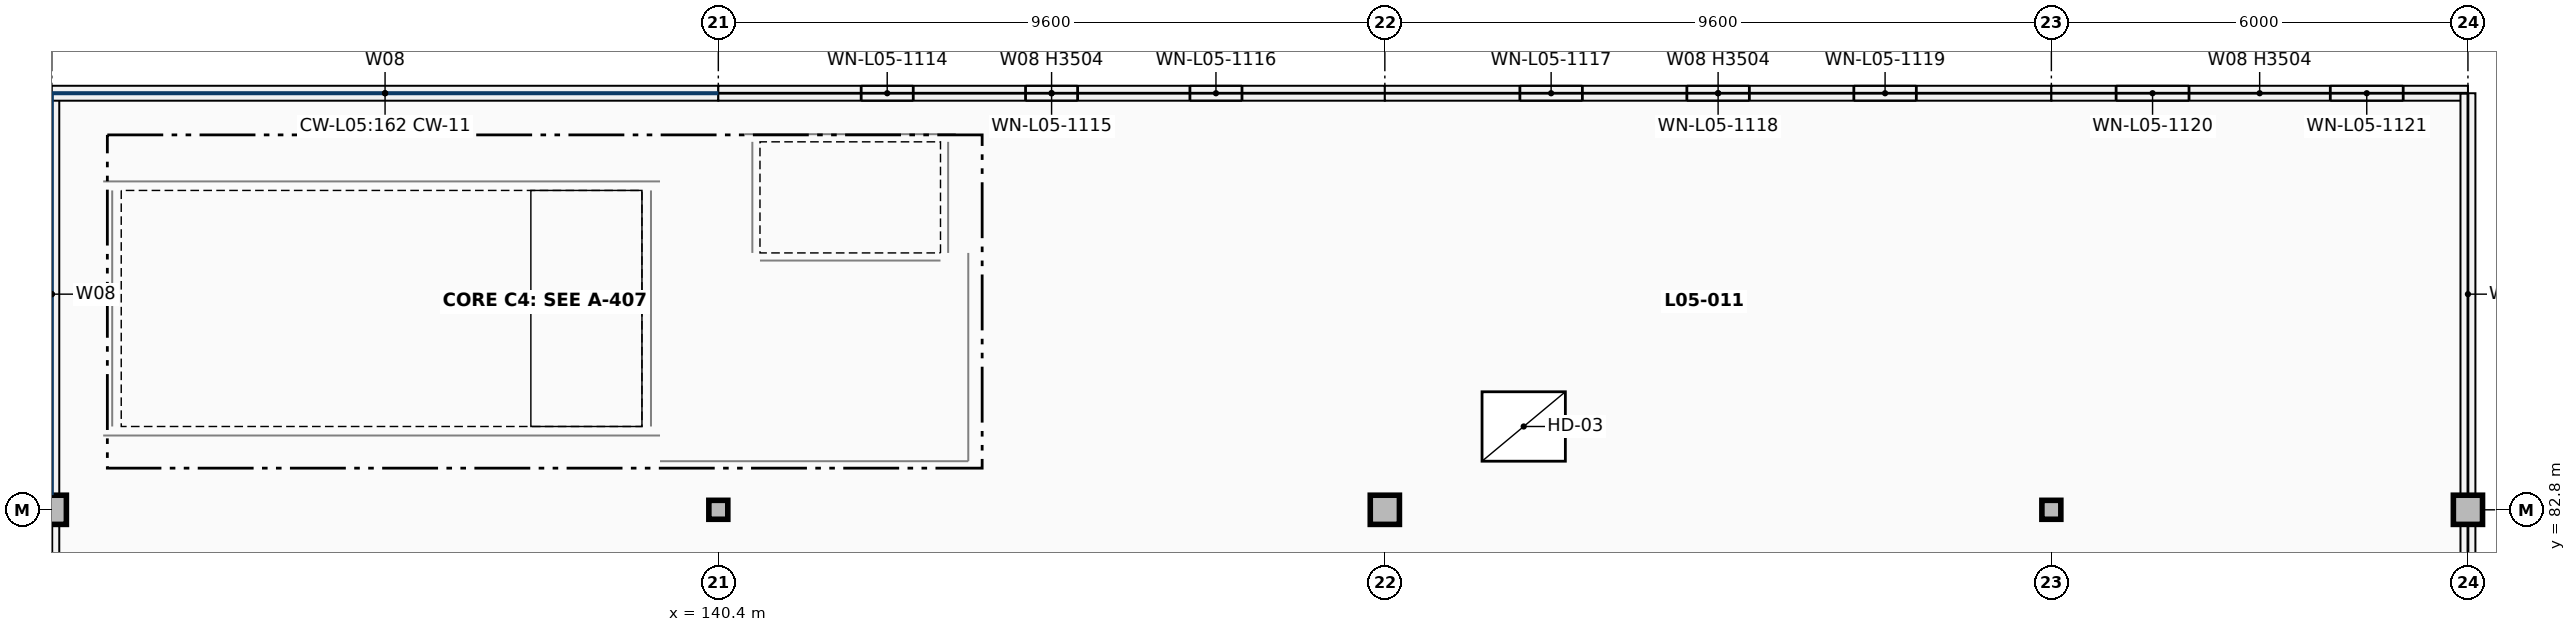
"""IFC4 building model, lengths in metres.
Left out: names, types, materials, properties, quantities, classifications, styles, units other than length and angle.
Written with IfcOpenShell. Run it as: python <this file> out.ifc"""

import sys

from ifc_helpers import new_model, si_unit, direction, frame, frame_2d, origin, origin_2d, place, context, subcontext, project, spatial, rectangle, hollow_circle, extrude, element, fill, save


model = new_model("IFC4")
c1 = context("Model", 3, precision=1e-05, world=origin(), true_north=direction((0.0, 1.0)))
c2 = subcontext(c1, "Body", "Model", "MODEL_VIEW")
j1 = project(units=[si_unit("LENGTHUNIT", "METRE"), si_unit("PLANEANGLEUNIT", "RADIAN")], contexts=[c1])
p1 = place(None, origin())
s1 = spatial("IfcSite", under=j1, at=p1, CompositionType="ELEMENT")
p2 = place(p1, origin())
s2 = spatial("IfcBuilding", under=s1, at=p2, CompositionType="ELEMENT")
p3 = place(p2, frame((0.0, 0.0, 21.08)))
s3 = spatial("IfcBuildingStorey", under=s2, at=p3, CompositionType="ELEMENT", Elevation=21.08)
p4 = place(p3, frame((130.8, 82.8, 0.0), z_axis=(0.0, 0.0, 1.0), x_axis=(1.0, 0.0, 0.0)))
e1 = element("IfcColumn", 1, at=p4, inside=s3, PredefinedType="COLUMN", context=c2, shape_type="SweptSolid", body=[
    extrude(rectangle(XDim=0.42, YDim=0.42, at=origin_2d()), origin(), (0.0, 0.0, 1.0), 3.74),
])
p5 = place(p3, frame((140.4, 82.8, 0.0), z_axis=(0.0, 0.0, 1.0), x_axis=(1.0, 0.0, 0.0)))
e2 = element("IfcColumn", 2, at=p5, inside=s3, PredefinedType="COLUMN", context=c2, shape_type="SweptSolid", body=[
    extrude(hollow_circle(Radius=0.136, WallThickness=0.012, at=origin_2d()), origin(), (0.0, 0.0, 1.0), 3.7),
])
p6 = place(p3, frame((150.0, 82.8, 0.0), z_axis=(0.0, 0.0, 1.0), x_axis=(1.0, 0.0, 0.0)))
e3 = element("IfcColumn", 3, at=p6, inside=s3, PredefinedType="COLUMN", context=c2, shape_type="SweptSolid", body=[
    extrude(rectangle(XDim=0.42, YDim=0.42, at=origin_2d()), origin(), (0.0, 0.0, 1.0), 3.74),
])
p7 = place(p3, frame((159.6, 82.8, 0.0), z_axis=(0.0, 0.0, 1.0), x_axis=(1.0, 0.0, 0.0)))
e4 = element("IfcColumn", 4, at=p7, inside=s3, PredefinedType="COLUMN", context=c2, shape_type="SweptSolid", body=[
    extrude(hollow_circle(Radius=0.136, WallThickness=0.012, at=origin_2d()), origin(), (0.0, 0.0, 1.0), 3.7),
])
p8 = place(p3, frame((165.6, 82.8, 0.0), z_axis=(0.0, 0.0, 1.0), x_axis=(1.0, 0.0, 0.0)))
e5 = element("IfcColumn", 5, at=p8, inside=s3, PredefinedType="COLUMN", context=c2, shape_type="SweptSolid", body=[
    extrude(rectangle(XDim=0.42, YDim=0.42, at=origin_2d()), origin(), (0.0, 0.0, 1.0), 3.74),
])
p9 = place(p3, frame((130.8, 79.412, 0.0), z_axis=(0.0, 0.0, 1.0), x_axis=(0.0, 1.0, 0.0)))
e6 = element("IfcWall", 6, at=p9, inside=s3, PredefinedType="SOLIDWALL", context=c2, shape_type="SweptSolid", body=[
    extrude(rectangle(XDim=3.176, YDim=0.215, at=frame_2d((1.588, 0.0))), origin(), (0.0, 0.0, 1.0), 2.884),
])
p10 = place(p3, frame((130.8, 83.012, 0.0), z_axis=(0.0, 0.0, 1.0), x_axis=(0.0, 1.0, 0.0)))
e7 = element("IfcWall", 7, at=p10, inside=s3, PredefinedType="SOLIDWALL", context=c2, shape_type="SweptSolid", body=[
    extrude(rectangle(XDim=5.788, YDim=0.215, at=frame_2d((2.894, 0.0))), origin(), (0.0, 0.0, 1.0), 0.85),
])
p11 = place(p3, frame((130.8, 88.8, 0.0), z_axis=(0.0, 0.0, 1.0), x_axis=(1.0, 0.0, 0.0)))
e8 = element("IfcWall", 8, at=p11, inside=s3, PredefinedType="SOLIDWALL", context=c2, shape_type="SweptSolid", body=[
    extrude(rectangle(XDim=9.6, YDim=0.215, at=frame_2d((4.8, 0.0))), origin(), (0.0, 0.0, 1.0), 0.85),
])
p12 = place(p3, frame((140.4, 88.8, 0.0), z_axis=(0.0, 0.0, 1.0), x_axis=(1.0, 0.0, 0.0)))
e9 = element("IfcWall", 9, at=p12, inside=s3, PredefinedType="SOLIDWALL", context=c2, shape_type="SweptSolid", body=[
    extrude(rectangle(XDim=9.6, YDim=0.215, at=frame_2d((4.8, 0.0))), origin(), (0.0, 0.0, 1.0), 3.504),
])
p13 = place(p12, frame((2.058, 0.0, 0.75)))
e10 = element("IfcOpeningElement", 10, at=p13, cuts=e9, PredefinedType="OPENING", context=c2, shape_type="SweptSolid", body=[
    extrude(rectangle(XDim=0.75, YDim=1.5, at=frame_2d((0.375, 0.75))), frame((0.0, 0.118, 0.0), z_axis=(0.0, -1.0, 0.0), x_axis=(1.0, 0.0, 0.0)), (0.0, 0.0, 1.0), 0.235),
])
p14 = place(p12, frame((4.425, 0.0, 0.75)))
e11 = element("IfcOpeningElement", 11, at=p14, cuts=e9, PredefinedType="OPENING", context=c2, shape_type="SweptSolid", body=[
    extrude(rectangle(XDim=0.75, YDim=1.5, at=frame_2d((0.375, 0.75))), frame((0.0, 0.118, 0.0), z_axis=(0.0, -1.0, 0.0), x_axis=(1.0, 0.0, 0.0)), (0.0, 0.0, 1.0), 0.235),
])
p15 = place(p12, frame((6.792, 0.0, 0.75)))
e12 = element("IfcOpeningElement", 12, at=p15, cuts=e9, PredefinedType="OPENING", context=c2, shape_type="SweptSolid", body=[
    extrude(rectangle(XDim=0.75, YDim=1.5, at=frame_2d((0.375, 0.75))), frame((0.0, 0.118, 0.0), z_axis=(0.0, -1.0, 0.0), x_axis=(1.0, 0.0, 0.0)), (0.0, 0.0, 1.0), 0.235),
])
p16 = place(p3, frame((150.0, 88.8, 0.0), z_axis=(0.0, 0.0, 1.0), x_axis=(1.0, 0.0, 0.0)))
e13 = element("IfcWall", 13, at=p16, inside=s3, PredefinedType="SOLIDWALL", context=c2, shape_type="SweptSolid", body=[
    extrude(rectangle(XDim=9.6, YDim=0.215, at=frame_2d((4.8, 0.0))), origin(), (0.0, 0.0, 1.0), 3.504),
])
p17 = place(p16, frame((1.945, 0.0, 0.75)))
e14 = element("IfcOpeningElement", 14, at=p17, cuts=e13, PredefinedType="OPENING", context=c2, shape_type="SweptSolid", body=[
    extrude(rectangle(XDim=0.9, YDim=1.95, at=frame_2d((0.45, 0.975))), frame((0.0, 0.118, 0.0), z_axis=(0.0, -1.0, 0.0), x_axis=(1.0, 0.0, 0.0)), (0.0, 0.0, 1.0), 0.235),
])
p18 = place(p16, frame((4.35, 0.0, 0.75)))
e15 = element("IfcOpeningElement", 15, at=p18, cuts=e13, PredefinedType="OPENING", context=c2, shape_type="SweptSolid", body=[
    extrude(rectangle(XDim=0.9, YDim=1.95, at=frame_2d((0.45, 0.975))), frame((0.0, 0.118, 0.0), z_axis=(0.0, -1.0, 0.0), x_axis=(1.0, 0.0, 0.0)), (0.0, 0.0, 1.0), 0.235),
])
p19 = place(p16, frame((6.755, 0.0, 0.75)))
e16 = element("IfcOpeningElement", 16, at=p19, cuts=e13, PredefinedType="OPENING", context=c2, shape_type="SweptSolid", body=[
    extrude(rectangle(XDim=0.9, YDim=1.95, at=frame_2d((0.45, 0.975))), frame((0.0, 0.118, 0.0), z_axis=(0.0, -1.0, 0.0), x_axis=(1.0, 0.0, 0.0)), (0.0, 0.0, 1.0), 0.235),
])
p20 = place(p3, frame((159.6, 88.8, 0.0), z_axis=(0.0, 0.0, 1.0), x_axis=(1.0, 0.0, 0.0)))
e17 = element("IfcWall", 17, at=p20, inside=s3, PredefinedType="SOLIDWALL", context=c2, shape_type="SweptSolid", body=[
    extrude(rectangle(XDim=6.0, YDim=0.215, at=frame_2d((3.0, 0.0))), origin(), (0.0, 0.0, 1.0), 3.504),
])
p21 = place(p20, frame((0.933, 0.0, 0.75)))
e18 = element("IfcOpeningElement", 18, at=p21, cuts=e17, PredefinedType="OPENING", context=c2, shape_type="SweptSolid", body=[
    extrude(rectangle(XDim=1.05, YDim=2.3, at=frame_2d((0.525, 1.15))), frame((0.0, 0.118, 0.0), z_axis=(0.0, -1.0, 0.0), x_axis=(1.0, 0.0, 0.0)), (0.0, 0.0, 1.0), 0.235),
])
p22 = place(p20, frame((4.018, 0.0, 0.75)))
e19 = element("IfcOpeningElement", 19, at=p22, cuts=e17, PredefinedType="OPENING", context=c2, shape_type="SweptSolid", body=[
    extrude(rectangle(XDim=1.05, YDim=2.3, at=frame_2d((0.525, 1.15))), frame((0.0, 0.118, 0.0), z_axis=(0.0, -1.0, 0.0), x_axis=(1.0, 0.0, 0.0)), (0.0, 0.0, 1.0), 0.235),
])
p23 = place(p3, frame((165.6, 79.412, 0.0), z_axis=(0.0, 0.0, 1.0), x_axis=(0.0, 1.0, 0.0)))
e20 = element("IfcWall", 20, at=p23, inside=s3, PredefinedType="SOLIDWALL", context=c2, shape_type="SweptSolid", body=[
    extrude(rectangle(XDim=3.176, YDim=0.215, at=frame_2d((1.588, 0.0))), origin(), (0.0, 0.0, 1.0), 3.074),
])
p24 = place(p3, frame((165.6, 83.012, 0.0), z_axis=(0.0, 0.0, 1.0), x_axis=(0.0, 1.0, 0.0)))
e21 = element("IfcWall", 21, at=p24, inside=s3, PredefinedType="SOLIDWALL", context=c2, shape_type="SweptSolid", body=[
    extrude(rectangle(XDim=5.788, YDim=0.215, at=frame_2d((2.894, 0.0))), origin(), (0.0, 0.0, 1.0), 3.074),
])
p25 = place(p3, frame((131.67, 84.0, 0.0), z_axis=(0.0, 0.0, 1.0), x_axis=(0.0, 1.0, 0.0)))
e22 = element("IfcWall", 22, at=p25, inside=s3, PredefinedType="SHEAR", context=c2, shape_type="SweptSolid", body=[
    extrude(rectangle(XDim=3.4, YDim=0.26, at=frame_2d((1.7, 0.0))), origin(), (0.0, 0.0, 1.0), 3.74),
])
for number, where, z_axis, x_axis in (
    (23, (131.54, 83.87, 0.0), (0.0, 0.0, 1.0), (1.0, 0.0, 0.0)),
    (24, (131.54, 87.53, 0.0), (0.0, 0.0, 1.0), (1.0, 0.0, 0.0)),
):
    element("IfcWall", number, at=place(p3, frame(where, z_axis=z_axis, x_axis=x_axis)), inside=s3, PredefinedType="SHEAR", context=c2, shape_type="SweptSolid", body=[
        extrude(rectangle(XDim=8.02, YDim=0.26, at=frame_2d((4.01, 0.0))), origin(), (0.0, 0.0, 1.0), 3.74),
    ])
p26 = place(p3, frame((139.43, 84.0, 0.0), z_axis=(0.0, 0.0, 1.0), x_axis=(0.0, 1.0, 0.0)))
e25 = element("IfcWall", 25, at=p26, inside=s3, PredefinedType="SHEAR", context=c2, shape_type="SweptSolid", body=[
    extrude(rectangle(XDim=3.4, YDim=0.26, at=frame_2d((1.7, 0.0))), origin(), (0.0, 0.0, 1.0), 3.74),
])
p27 = place(p26, frame((0.65, 0.0, 0.0)))
e26 = element("IfcOpeningElement", 26, at=p27, cuts=e25, PredefinedType="OPENING", context=c2, shape_type="SweptSolid", body=[
    extrude(rectangle(XDim=1.2, YDim=2.2, at=frame_2d((0.6, 1.1))), frame((0.0, 0.14, 0.0), z_axis=(0.0, -1.0, 0.0), x_axis=(1.0, 0.0, 0.0)), (0.0, 0.0, 1.0), 0.28),
])
for number, where, z_axis, x_axis in (
    (27, (140.89, 86.5, 0.0), (0.0, 0.0, 1.0), (0.0, 1.0, 0.0)),
    (28, (143.71, 86.5, 0.0), (0.0, 0.0, 1.0), (0.0, 1.0, 0.0)),
):
    element("IfcWall", number, at=place(p3, frame(where, z_axis=z_axis, x_axis=x_axis)), inside=s3, PredefinedType="SHEAR", context=c2, shape_type="SweptSolid", body=[
        extrude(rectangle(XDim=1.6, YDim=0.22, at=frame_2d((0.8, 0.0))), origin(), (0.0, 0.0, 1.0), 3.74),
    ])
p28 = place(p3, frame((140.78, 88.21, 0.0), z_axis=(0.0, 0.0, 1.0), x_axis=(1.0, 0.0, 0.0)))
e29 = element("IfcWall", 29, at=p28, inside=s3, PredefinedType="SHEAR", context=c2, shape_type="SweptSolid", body=[
    extrude(rectangle(XDim=3.04, YDim=0.22, at=frame_2d((1.52, 0.0))), origin(), (0.0, 0.0, 1.0), 3.74),
])
p29 = place(p3, frame((141.0, 86.39, 0.0), z_axis=(0.0, 0.0, 1.0), x_axis=(1.0, 0.0, 0.0)))
e30 = element("IfcWall", 30, at=p29, inside=s3, PredefinedType="SHEAR", context=c2, shape_type="SweptSolid", body=[
    extrude(rectangle(XDim=2.6, YDim=0.22, at=frame_2d((1.3, 0.0))), origin(), (0.0, 0.0, 1.0), 3.74),
])
p30 = place(p29, frame((0.8, 0.0, 0.0)))
e31 = element("IfcOpeningElement", 31, at=p30, cuts=e30, PredefinedType="OPENING", context=c2, shape_type="SweptSolid", body=[
    extrude(rectangle(XDim=1.0, YDim=2.15, at=frame_2d((0.5, 1.075))), frame((0.0, 0.12, 0.0), z_axis=(0.0, -1.0, 0.0), x_axis=(1.0, 0.0, 0.0)), (0.0, 0.0, 1.0), 0.24),
])
p31 = place(p3, frame((144.0, 83.5, 0.0), z_axis=(0.0, 0.0, 1.0), x_axis=(0.0, 1.0, 0.0)))
e32 = element("IfcWall", 32, at=p31, inside=s3, PredefinedType="PARTITIONING", context=c2, shape_type="SweptSolid", body=[
    extrude(rectangle(XDim=3.0, YDim=0.2, at=frame_2d((1.5, 0.0))), origin(), (0.0, 0.0, 1.0), 3.494),
])
p32 = place(p31, frame((0.775, 0.0, 0.0)))
e33 = element("IfcOpeningElement", 33, at=p32, cuts=e32, PredefinedType="OPENING", context=c2, shape_type="SweptSolid", body=[
    extrude(rectangle(XDim=1.45, YDim=2.2, at=frame_2d((0.725, 1.1))), frame((0.0, 0.11, 0.0), z_axis=(0.0, -1.0, 0.0), x_axis=(1.0, 0.0, 0.0)), (0.0, 0.0, 1.0), 0.22),
])
p33 = place(p3, frame((139.56, 83.5, 0.0), z_axis=(0.0, 0.0, 1.0), x_axis=(1.0, 0.0, 0.0)))
e34 = element("IfcWall", 34, at=p33, inside=s3, PredefinedType="PARTITIONING", context=c2, shape_type="SweptSolid", body=[
    extrude(rectangle(XDim=4.44, YDim=0.2, at=frame_2d((2.22, 0.0))), origin(), (0.0, 0.0, 1.0), 3.494),
])
p34 = place(p13, origin())
e35 = element("IfcWindow", 35, at=p34, inside=s3, PartitioningType="SINGLE_PANEL", PredefinedType="WINDOW", context=c2, shape_type="SweptSolid", body=[
    extrude(rectangle(XDim=0.75, YDim=1.5, at=frame_2d((0.375, 0.75))), frame((0.0, 0.03, 0.0), z_axis=(0.0, -1.0, 0.0), x_axis=(1.0, 0.0, 0.0)), (0.0, 0.0, 1.0), 0.06),
])
fill(e10, e35)
p35 = place(p14, origin())
e36 = element("IfcWindow", 36, at=p35, inside=s3, PartitioningType="SINGLE_PANEL", PredefinedType="WINDOW", context=c2, shape_type="SweptSolid", body=[
    extrude(rectangle(XDim=0.75, YDim=1.5, at=frame_2d((0.375, 0.75))), frame((0.0, 0.03, 0.0), z_axis=(0.0, -1.0, 0.0), x_axis=(1.0, 0.0, 0.0)), (0.0, 0.0, 1.0), 0.06),
])
fill(e11, e36)
p36 = place(p15, origin())
e37 = element("IfcWindow", 37, at=p36, inside=s3, PartitioningType="SINGLE_PANEL", PredefinedType="WINDOW", context=c2, shape_type="SweptSolid", body=[
    extrude(rectangle(XDim=0.75, YDim=1.5, at=frame_2d((0.375, 0.75))), frame((0.0, 0.03, 0.0), z_axis=(0.0, -1.0, 0.0), x_axis=(1.0, 0.0, 0.0)), (0.0, 0.0, 1.0), 0.06),
])
fill(e12, e37)
p37 = place(p17, origin())
e38 = element("IfcWindow", 38, at=p37, inside=s3, PartitioningType="SINGLE_PANEL", PredefinedType="WINDOW", context=c2, shape_type="SweptSolid", body=[
    extrude(rectangle(XDim=0.9, YDim=1.95, at=frame_2d((0.45, 0.975))), frame((0.0, 0.03, 0.0), z_axis=(0.0, -1.0, 0.0), x_axis=(1.0, 0.0, 0.0)), (0.0, 0.0, 1.0), 0.06),
])
fill(e14, e38)
p38 = place(p18, origin())
e39 = element("IfcWindow", 39, at=p38, inside=s3, PartitioningType="SINGLE_PANEL", PredefinedType="WINDOW", context=c2, shape_type="SweptSolid", body=[
    extrude(rectangle(XDim=0.9, YDim=1.95, at=frame_2d((0.45, 0.975))), frame((0.0, 0.03, 0.0), z_axis=(0.0, -1.0, 0.0), x_axis=(1.0, 0.0, 0.0)), (0.0, 0.0, 1.0), 0.06),
])
fill(e15, e39)
p39 = place(p19, origin())
e40 = element("IfcWindow", 40, at=p39, inside=s3, PartitioningType="SINGLE_PANEL", PredefinedType="WINDOW", context=c2, shape_type="SweptSolid", body=[
    extrude(rectangle(XDim=0.9, YDim=1.95, at=frame_2d((0.45, 0.975))), frame((0.0, 0.03, 0.0), z_axis=(0.0, -1.0, 0.0), x_axis=(1.0, 0.0, 0.0)), (0.0, 0.0, 1.0), 0.06),
])
fill(e16, e40)
p40 = place(p21, origin())
e41 = element("IfcWindow", 41, at=p40, inside=s3, PartitioningType="SINGLE_PANEL", PredefinedType="WINDOW", context=c2, shape_type="SweptSolid", body=[
    extrude(rectangle(XDim=1.05, YDim=2.3, at=frame_2d((0.525, 1.15))), frame((0.0, 0.03, 0.0), z_axis=(0.0, -1.0, 0.0), x_axis=(1.0, 0.0, 0.0)), (0.0, 0.0, 1.0), 0.06),
])
fill(e18, e41)
p41 = place(p22, origin())
e42 = element("IfcWindow", 42, at=p41, inside=s3, PartitioningType="SINGLE_PANEL", PredefinedType="WINDOW", context=c2, shape_type="SweptSolid", body=[
    extrude(rectangle(XDim=1.05, YDim=2.3, at=frame_2d((0.525, 1.15))), frame((0.0, 0.03, 0.0), z_axis=(0.0, -1.0, 0.0), x_axis=(1.0, 0.0, 0.0)), (0.0, 0.0, 1.0), 0.06),
])
fill(e19, e42)
p42 = place(p2, frame((0.0, 0.0, 24.82)))
p43 = place(p42, frame((0.0, 0.0, -0.18)))
p44 = place(p43, frame((152.0, 84.0, 0.12)))
e43 = element("IfcDoor", 43, at=p44, inside=s3, OperationType="SINGLE_SWING_LEFT", PredefinedType="TRAPDOOR", context=c2, shape_type="SweptSolid", body=[
    extrude(rectangle(XDim=1.2, YDim=1.0, at=origin_2d()), origin(), (0.0, 0.0, 1.0), 0.06),
])
p45 = place(p27, origin())
e44 = element("IfcDoor", 44, at=p45, inside=s3, OperationType="SINGLE_SWING_RIGHT", PredefinedType="DOOR", context=c2, shape_type="SweptSolid", body=[
    extrude(rectangle(XDim=1.2, YDim=2.2, at=frame_2d((0.6, 1.1))), frame((0.0, 0.025, 0.0), z_axis=(0.0, -1.0, 0.0), x_axis=(1.0, 0.0, 0.0)), (0.0, 0.0, 1.0), 0.05),
])
fill(e26, e44)
p46 = place(p30, origin())
e45 = element("IfcDoor", 45, at=p46, inside=s3, OperationType="DOUBLE_DOOR_SLIDING", PredefinedType="DOOR", context=c2, shape_type="SweptSolid", body=[
    extrude(rectangle(XDim=1.0, YDim=2.15, at=frame_2d((0.5, 1.075))), frame((0.0, 0.025, 0.0), z_axis=(0.0, -1.0, 0.0), x_axis=(1.0, 0.0, 0.0)), (0.0, 0.0, 1.0), 0.05),
])
fill(e31, e45)
p47 = place(p32, frame((1.45, 0.0, 0.0), z_axis=(0.0, 0.0, 1.0), x_axis=(-1.0, 0.0, 0.0)))
e46 = element("IfcDoor", 46, at=p47, inside=s3, OperationType="DOUBLE_DOOR_SINGLE_SWING", PredefinedType="DOOR", context=c2, shape_type="SweptSolid", body=[
    extrude(rectangle(XDim=1.45, YDim=2.2, at=frame_2d((0.725, 1.1))), frame((0.0, 0.025, 0.0), z_axis=(0.0, -1.0, 0.0), x_axis=(1.0, 0.0, 0.0)), (0.0, 0.0, 1.0), 0.05),
])
fill(e33, e46)
save(model, sys.argv[1])
